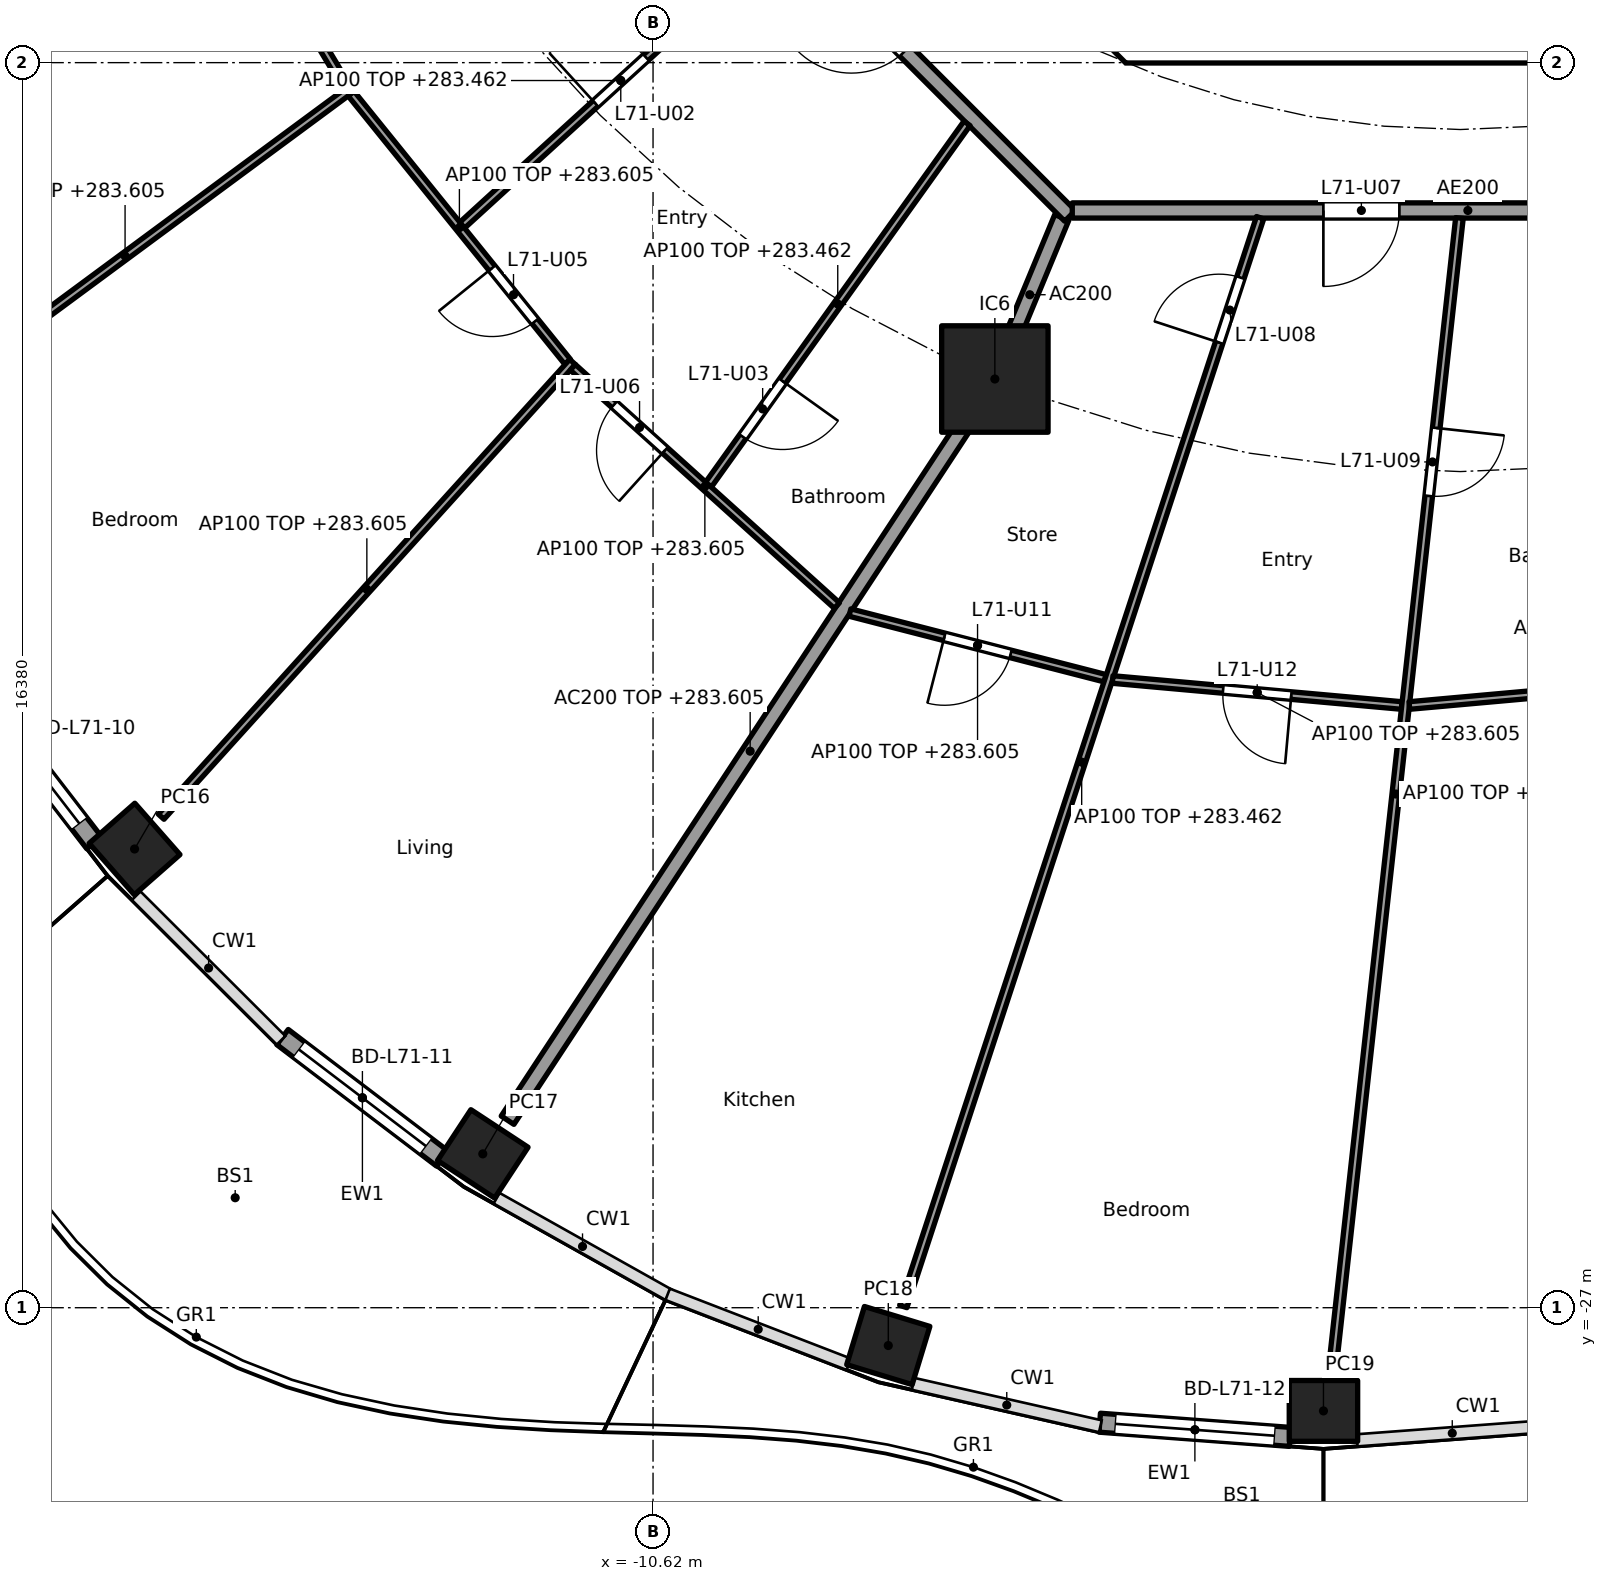
"""IFC4 building model, lengths in metres.
Left out: names, types, materials, properties, quantities, classifications, styles, units other than length and angle.
Written with IfcOpenShell. Run it as: python <this file> out.ifc"""

import sys

from ifc_helpers import new_model, si_unit, direction, frame, frame_2d, origin, origin_2d, place, context, subcontext, project, spatial, polyline, rectangle, hollow_rectangle, outline, extrude, element, fill, save


model = new_model("IFC4")
c1 = context("Model", 3, precision=1e-05, world=origin(), true_north=direction((0.0, 1.0)))
c2 = subcontext(c1, "Body", "Model", "MODEL_VIEW")
j1 = project(units=[si_unit("LENGTHUNIT", "METRE"), si_unit("PLANEANGLEUNIT", "RADIAN")], contexts=[c1])
p1 = place(None, origin())
s1 = spatial("IfcSite", under=j1, at=p1, CompositionType="ELEMENT")
p2 = place(p1, origin())
s2 = spatial("IfcBuilding", under=s1, at=p2, CompositionType="ELEMENT")
p3 = place(p2, frame((0.0, 0.0, 280.7)))
s3 = spatial("IfcBuildingStorey", under=s2, at=p3, CompositionType="ELEMENT", Elevation=280.7)
for number, where, z_axis, x_axis in (
    (1, (-17.441, -20.965, 0.0), (0.0, 0.0, 1.0), (0.66, -0.751, 0.0)),
    (2, (-12.86, -24.976, 0.0), (0.0, 0.0, 1.0), (0.836, -0.549, 0.0)),
    (3, (-7.525, -27.498, 0.0), (0.0, 0.0, 1.0), (0.957, -0.292, 0.0)),
    (4, (-1.8, -28.358, 0.0), (0.0, 0.0, 1.0), (1.0, 0.0, 0.0)),
):
    element("IfcColumn", number, at=place(p3, frame(where, z_axis=z_axis, x_axis=x_axis)), inside=s3, PredefinedType="COLUMN", context=c2, shape_type="SweptSolid", body=[
        extrude(hollow_rectangle(XDim=0.9, YDim=0.8, WallThickness=0.028, at=origin_2d()), origin(), (0.0, 0.0, 1.0), 3.7),
    ])
p4 = place(p3, frame((-6.123, -14.782, 0.0), z_axis=(0.0, 0.0, 1.0), x_axis=(1.0, 0.0, 0.0)))
e5 = element("IfcColumn", 5, at=p4, inside=s3, PredefinedType="COLUMN", context=c2, shape_type="SweptSolid", body=[
    extrude(rectangle(XDim=1.4, YDim=1.4, at=origin_2d()), origin(), (0.0, 0.0, 1.0), 3.7),
])
p5 = place(p3, frame((-17.97, -20.886, 0.0), z_axis=(0.0, 0.0, 1.0), x_axis=(-0.610432336622, 0.792068407656, 0.0)))
e6 = element("IfcWall", 6, at=p5, inside=s3, PredefinedType="SOLIDWALL", context=c2, shape_type="SweptSolid", body=[
    extrude(rectangle(XDim=2.746, YDim=0.25, at=frame_2d((1.373, 0.0))), origin(), (0.0, 0.0, 1.0), 3.44),
])
p6 = place(p5, frame((0.323, 0.0, 0.0)))
e7 = element("IfcOpeningElement", 7, at=p6, cuts=e6, PredefinedType="OPENING", context=c2, shape_type="SweptSolid", body=[
    extrude(rectangle(XDim=2.1, YDim=2.4, at=frame_2d((1.05, 1.2))), frame((0.0, 0.135, 0.0), z_axis=(0.0, -1.0, 0.0), x_axis=(1.0, 0.0, 0.0)), (0.0, 0.0, 1.0), 0.27),
])
p7 = place(p3, frame((-13.393, -25.037, 0.0), z_axis=(0.0, 0.0, 1.0), x_axis=(-0.796055284084, 0.605223912847, 0.0)))
e8 = element("IfcWall", 8, at=p7, inside=s3, PredefinedType="SOLIDWALL", context=c2, shape_type="SweptSolid", body=[
    extrude(rectangle(XDim=2.641, YDim=0.25, at=frame_2d((1.32, 0.0))), origin(), (0.0, 0.0, 1.0), 3.44),
])
p8 = place(p7, frame((0.27, 0.0, 0.0)))
e9 = element("IfcOpeningElement", 9, at=p8, cuts=e8, PredefinedType="OPENING", context=c2, shape_type="SweptSolid", body=[
    extrude(rectangle(XDim=2.1, YDim=2.4, at=frame_2d((1.05, 1.2))), frame((0.0, 0.135, 0.0), z_axis=(0.0, -1.0, 0.0), x_axis=(1.0, 0.0, 0.0)), (0.0, 0.0, 1.0), 0.27),
])
p9 = place(p3, frame((-2.24, -28.699, 0.0), z_axis=(0.0, 0.0, 1.0), x_axis=(-0.997236355794, 0.074294351616, 0.0)))
e10 = element("IfcWall", 10, at=p9, inside=s3, PredefinedType="SOLIDWALL", context=c2, shape_type="SweptSolid", body=[
    extrude(rectangle(XDim=2.51, YDim=0.25, at=frame_2d((1.255, 0.0))), origin(), (0.0, 0.0, 1.0), 3.44),
])
p10 = place(p9, frame((0.205, 0.0, 0.0)))
e11 = element("IfcOpeningElement", 11, at=p10, cuts=e10, PredefinedType="OPENING", context=c2, shape_type="SweptSolid", body=[
    extrude(rectangle(XDim=2.1, YDim=2.4, at=frame_2d((1.05, 1.2))), frame((0.0, 0.135, 0.0), z_axis=(0.0, -1.0, 0.0), x_axis=(1.0, 0.0, 0.0)), (0.0, 0.0, 1.0), 0.27),
])
p11 = place(p3, origin())
e12 = element("IfcWall", 12, at=p11, inside=s3, PredefinedType="SHEAR", context=c2, shape_type="SweptSolid", body=[
    extrude(outline(polyline([(-4.152, -10.025), (4.152, -10.025), (4.401, -9.776), (4.825, -10.2), (4.401, -10.625), (-4.401, -10.625), (-4.825, -10.2), (-4.401, -9.776), (-4.152, -10.025)])), origin(), (0.0, 0.0, 1.0), 3.44),
])
p12 = place(p3, frame((-5.243, -12.657, 0.0), z_axis=(0.0, 0.0, 1.0), x_axis=(-0.382770106157, -0.923843626288, 0.0)))
e13 = element("IfcWall", 13, at=p12, inside=s3, PredefinedType="PARTITIONING", context=c2, shape_type="SweptSolid", body=[
    extrude(rectangle(XDim=2.199, YDim=0.2, at=frame_2d((1.1, 0.0))), origin(), (0.0, 0.0, 1.0), 3.44),
])
p13 = place(p3, frame((-6.151, -14.824, 0.0), z_axis=(0.0, 0.0, 1.0), x_axis=(-0.549345577828, -0.835595258556, 0.0)))
e14 = element("IfcWall", 14, at=p13, inside=s3, PredefinedType="PARTITIONING", context=c2, shape_type="SweptSolid", body=[
    extrude(rectangle(XDim=11.62, YDim=0.2, at=frame_2d((5.81, 0.0))), origin(), (0.0, 0.0, 1.0), 2.905),
])
p14 = place(p3, frame((-12.635, -5.134, 0.0), z_axis=(0.0, 0.0, 1.0), x_axis=(0.707106781187, -0.707106781187, 0.0)))
e15 = element("IfcWall", 15, at=p14, inside=s3, PredefinedType="PARTITIONING", context=c2, shape_type="SweptSolid", body=[
    extrude(rectangle(XDim=10.609, YDim=0.2, at=frame_2d((5.305, 0.0))), origin(), (0.0, 0.0, 1.0), 3.44),
])
p15 = place(p14, frame((6.539, 0.0, 0.0)))
e16 = element("IfcOpeningElement", 16, at=p15, cuts=e15, PredefinedType="OPENING", context=c2, shape_type="SweptSolid", body=[
    extrude(rectangle(XDim=1.0, YDim=2.1, at=frame_2d((0.5, 1.05))), frame((0.0, 0.11, 0.0), z_axis=(0.0, -1.0, 0.0), x_axis=(1.0, 0.0, 0.0)), (0.0, 0.0, 1.0), 0.22),
])
p16 = place(p3, frame((-5.104, -12.565, 0.0), z_axis=(0.0, 0.0, 1.0), x_axis=(1.0, 0.0, 0.0)))
e17 = element("IfcWall", 17, at=p16, inside=s3, PredefinedType="PARTITIONING", context=c2, shape_type="SweptSolid", body=[
    extrude(rectangle(XDim=10.409, YDim=0.2, at=frame_2d((5.205, 0.0))), origin(), (0.0, 0.0, 1.0), 3.44),
])
p17 = place(p16, frame((3.303, 0.0, 0.0)))
e18 = element("IfcOpeningElement", 18, at=p17, cuts=e17, PredefinedType="OPENING", context=c2, shape_type="SweptSolid", body=[
    extrude(rectangle(XDim=1.0, YDim=2.1, at=frame_2d((0.5, 1.05))), frame((0.0, 0.11, 0.0), z_axis=(0.0, -1.0, 0.0), x_axis=(1.0, 0.0, 0.0)), (0.0, 0.0, 1.0), 0.22),
])
p18 = place(p3, frame((-16.946, -7.122, 0.0), z_axis=(0.0, 0.0, 1.0), x_axis=(0.514994556856, -0.857193447483, 0.0)))
e19 = element("IfcWall", 19, at=p18, inside=s3, PredefinedType="PARTITIONING", context=c2, shape_type="SweptSolid", body=[
    extrude(rectangle(XDim=4.462, YDim=0.1, at=frame_2d((2.231, 0.0))), origin(), (0.0, 0.0, 1.0), 2.905),
])
p19 = place(p18, frame((1.781, 0.0, 0.0)))
e20 = element("IfcOpeningElement", 20, at=p19, cuts=e19, PredefinedType="OPENING", context=c2, shape_type="SweptSolid", body=[
    extrude(rectangle(XDim=0.9, YDim=2.1, at=frame_2d((0.45, 1.05))), frame((0.0, 0.06, 0.0), z_axis=(0.0, -1.0, 0.0), x_axis=(1.0, 0.0, 0.0)), (0.0, 0.0, 1.0), 0.12),
])
p20 = place(p3, frame((-14.582, -10.96, 0.0), z_axis=(0.0, 0.0, 1.0), x_axis=(-0.804405200554, -0.594081032623, 0.0)))
e21 = element("IfcWall", 21, at=p20, inside=s3, PredefinedType="PARTITIONING", context=c2, shape_type="SweptSolid", body=[
    extrude(rectangle(XDim=7.418, YDim=0.1, at=frame_2d((3.709, 0.0))), origin(), (0.0, 0.0, 1.0), 2.905),
])
p21 = place(p3, frame((-14.591, -11.029, 0.0), z_axis=(0.0, 0.0, 1.0), x_axis=(0.628170338674, -0.778075848237, 0.0)))
e22 = element("IfcWall", 22, at=p21, inside=s3, PredefinedType="PARTITIONING", context=c2, shape_type="SweptSolid", body=[
    extrude(rectangle(XDim=4.532, YDim=0.1, at=frame_2d((2.266, 0.0))), origin(), (0.0, 0.0, 1.0), 2.905),
])
p22 = place(p21, frame((2.949, 0.0, 0.0)))
e23 = element("IfcOpeningElement", 23, at=p22, cuts=e22, PredefinedType="OPENING", context=c2, shape_type="SweptSolid", body=[
    extrude(rectangle(XDim=0.9, YDim=2.1, at=frame_2d((0.45, 1.05))), frame((0.0, 0.06, 0.0), z_axis=(0.0, -1.0, 0.0), x_axis=(1.0, 0.0, 0.0)), (0.0, 0.0, 1.0), 0.12),
])
p23 = place(p3, frame((-8.958, -8.952, 0.0), z_axis=(0.0, 0.0, 1.0), x_axis=(-0.73876526954, -0.673962815385, 0.0)))
e24 = element("IfcWall", 24, at=p23, inside=s3, PredefinedType="PARTITIONING", context=c2, shape_type="SweptSolid", body=[
    extrude(rectangle(XDim=5.647, YDim=0.1, at=frame_2d((2.824, 0.0))), origin(), (0.0, 0.0, 1.0), 2.762),
])
p24 = place(p23, frame((2.374, 0.0, 0.0)))
e25 = element("IfcOpeningElement", 25, at=p24, cuts=e24, PredefinedType="OPENING", context=c2, shape_type="SweptSolid", body=[
    extrude(rectangle(XDim=0.9, YDim=2.1, at=frame_2d((0.45, 1.05))), frame((0.0, 0.06, 0.0), z_axis=(0.0, -1.0, 0.0), x_axis=(1.0, 0.0, 0.0)), (0.0, 0.0, 1.0), 0.12),
])
p25 = place(p3, frame((-11.679, -14.557, 0.0), z_axis=(0.0, 0.0, 1.0), x_axis=(-0.670800011545, -0.741638284146, 0.0)))
e26 = element("IfcWall", 26, at=p25, inside=s3, PredefinedType="PARTITIONING", context=c2, shape_type="SweptSolid", body=[
    extrude(rectangle(XDim=8.068, YDim=0.1, at=frame_2d((4.034, 0.0))), origin(), (0.0, 0.0, 1.0), 2.905),
])
p26 = place(p3, frame((-11.676, -14.628, 0.0), z_axis=(0.0, 0.0, 1.0), x_axis=(0.74245829867, -0.669892285921, 0.0)))
e27 = element("IfcWall", 27, at=p26, inside=s3, PredefinedType="PARTITIONING", context=c2, shape_type="SweptSolid", body=[
    extrude(rectangle(XDim=4.68, YDim=0.1, at=frame_2d((2.34, 0.0))), origin(), (0.0, 0.0, 1.0), 2.905),
])
p27 = place(p26, frame((0.732, 0.0, 0.0)))
e28 = element("IfcOpeningElement", 28, at=p27, cuts=e27, PredefinedType="OPENING", context=c2, shape_type="SweptSolid", body=[
    extrude(rectangle(XDim=0.9, YDim=2.1, at=frame_2d((0.45, 1.05))), frame((0.0, 0.06, 0.0), z_axis=(0.0, -1.0, 0.0), x_axis=(1.0, 0.0, 0.0)), (0.0, 0.0, 1.0), 0.12),
])
p28 = place(p3, frame((-6.49, -11.419, 0.0), z_axis=(0.0, 0.0, 1.0), x_axis=(-0.58201647594, -0.813176992871, 0.0)))
e29 = element("IfcWall", 29, at=p28, inside=s3, PredefinedType="PARTITIONING", context=c2, shape_type="SweptSolid", body=[
    extrude(rectangle(XDim=5.844, YDim=0.1, at=frame_2d((2.922, 0.0))), origin(), (0.0, 0.0, 1.0), 2.762),
])
p29 = place(p28, frame((4.169, 0.0, 0.0)))
e30 = element("IfcOpeningElement", 30, at=p29, cuts=e29, PredefinedType="OPENING", context=c2, shape_type="SweptSolid", body=[
    extrude(rectangle(XDim=0.9, YDim=2.1, at=frame_2d((0.45, 1.05))), frame((0.0, 0.06, 0.0), z_axis=(0.0, -1.0, 0.0), x_axis=(1.0, 0.0, 0.0)), (0.0, 0.0, 1.0), 0.12),
])
p30 = place(p3, frame((-8.03, -17.854, 0.0), z_axis=(0.0, 0.0, 1.0), x_axis=(0.968441967324, -0.249239154077, 0.0)))
e31 = element("IfcWall", 31, at=p30, inside=s3, PredefinedType="PARTITIONING", context=c2, shape_type="SweptSolid", body=[
    extrude(rectangle(XDim=3.468, YDim=0.1, at=frame_2d((1.734, 0.0))), origin(), (0.0, 0.0, 1.0), 2.905),
])
p31 = place(p30, frame((1.284, 0.0, 0.0)))
e32 = element("IfcOpeningElement", 32, at=p31, cuts=e31, PredefinedType="OPENING", context=c2, shape_type="SweptSolid", body=[
    extrude(rectangle(XDim=0.9, YDim=2.1, at=frame_2d((0.45, 1.05))), frame((0.0, 0.06, 0.0), z_axis=(0.0, -1.0, 0.0), x_axis=(1.0, 0.0, 0.0)), (0.0, 0.0, 1.0), 0.12),
])
p32 = place(p3, frame((-2.633, -12.66, 0.0), z_axis=(0.0, 0.0, 1.0), x_axis=(-0.311432955908, -0.950268127412, 0.0)))
e33 = element("IfcWall", 33, at=p32, inside=s3, PredefinedType="PARTITIONING", context=c2, shape_type="SweptSolid", body=[
    extrude(rectangle(XDim=15.074, YDim=0.1, at=frame_2d((7.537, 0.0))), origin(), (0.0, 0.0, 1.0), 2.762),
])
p33 = place(p32, frame((0.829, 0.0, 0.0)))
e34 = element("IfcOpeningElement", 34, at=p33, cuts=e33, PredefinedType="OPENING", context=c2, shape_type="SweptSolid", body=[
    extrude(rectangle(XDim=0.9, YDim=2.1, at=frame_2d((0.45, 1.05))), frame((0.0, 0.06, 0.0), z_axis=(0.0, -1.0, 0.0), x_axis=(1.0, 0.0, 0.0)), (0.0, 0.0, 1.0), 0.12),
])
p34 = place(p3, frame((-4.573, -18.736, 0.0), z_axis=(0.0, 0.0, 1.0), x_axis=(0.995986472869, -0.089503887414, 0.0)))
e35 = element("IfcWall", 35, at=p34, inside=s3, PredefinedType="PARTITIONING", context=c2, shape_type="SweptSolid", body=[
    extrude(rectangle(XDim=3.819, YDim=0.1, at=frame_2d((1.909, 0.0))), origin(), (0.0, 0.0, 1.0), 2.905),
])
p35 = place(p34, frame((1.459, 0.0, 0.0)))
e36 = element("IfcOpeningElement", 36, at=p35, cuts=e35, PredefinedType="OPENING", context=c2, shape_type="SweptSolid", body=[
    extrude(rectangle(XDim=0.9, YDim=2.1, at=frame_2d((0.45, 1.05))), frame((0.0, 0.06, 0.0), z_axis=(0.0, -1.0, 0.0), x_axis=(1.0, 0.0, 0.0)), (0.0, 0.0, 1.0), 0.12),
])
p36 = place(p3, frame((-0.011, -12.664, 0.0), z_axis=(0.0, 0.0, 1.0), x_axis=(-0.109805889692, -0.993953050495, 0.0)))
e37 = element("IfcWall", 37, at=p36, inside=s3, PredefinedType="PARTITIONING", context=c2, shape_type="SweptSolid", body=[
    extrude(rectangle(XDim=15.248, YDim=0.1, at=frame_2d((7.624, 0.0))), origin(), (0.0, 0.0, 1.0), 2.762),
])
p37 = place(p36, frame((2.778, 0.0, 0.0)))
e38 = element("IfcOpeningElement", 38, at=p37, cuts=e37, PredefinedType="OPENING", context=c2, shape_type="SweptSolid", body=[
    extrude(rectangle(XDim=0.9, YDim=2.1, at=frame_2d((0.45, 1.05))), frame((0.0, 0.06, 0.0), z_axis=(0.0, -1.0, 0.0), x_axis=(1.0, 0.0, 0.0)), (0.0, 0.0, 1.0), 0.12),
])
p38 = place(p3, frame((-0.67, -19.077, 0.0), z_axis=(0.0, 0.0, 1.0), x_axis=(0.995986472869, 0.089503887414, 0.0)))
e39 = element("IfcWall", 39, at=p38, inside=s3, PredefinedType="PARTITIONING", context=c2, shape_type="SweptSolid", body=[
    extrude(rectangle(XDim=3.819, YDim=0.1, at=frame_2d((1.909, 0.0))), origin(), (0.0, 0.0, 1.0), 2.905),
])
p39 = place(p6, origin())
e40 = element("IfcDoor", 40, at=p39, inside=s3, OperationType="SLIDING_TO_LEFT", PredefinedType="DOOR", context=c2, shape_type="SweptSolid", body=[
    extrude(rectangle(XDim=2.1, YDim=2.4, at=frame_2d((1.05, 1.2))), frame((0.0, 0.025, 0.0), z_axis=(0.0, -1.0, 0.0), x_axis=(1.0, 0.0, 0.0)), (0.0, 0.0, 1.0), 0.05),
])
fill(e7, e40)
p40 = place(p8, origin())
e41 = element("IfcDoor", 41, at=p40, inside=s3, OperationType="SLIDING_TO_LEFT", PredefinedType="DOOR", context=c2, shape_type="SweptSolid", body=[
    extrude(rectangle(XDim=2.1, YDim=2.4, at=frame_2d((1.05, 1.2))), frame((0.0, 0.025, 0.0), z_axis=(0.0, -1.0, 0.0), x_axis=(1.0, 0.0, 0.0)), (0.0, 0.0, 1.0), 0.05),
])
fill(e9, e41)
p41 = place(p10, origin())
e42 = element("IfcDoor", 42, at=p41, inside=s3, OperationType="SLIDING_TO_LEFT", PredefinedType="DOOR", context=c2, shape_type="SweptSolid", body=[
    extrude(rectangle(XDim=2.1, YDim=2.4, at=frame_2d((1.05, 1.2))), frame((0.0, 0.025, 0.0), z_axis=(0.0, -1.0, 0.0), x_axis=(1.0, 0.0, 0.0)), (0.0, 0.0, 1.0), 0.05),
])
fill(e11, e42)
p42 = place(p24, frame((0.9, 0.0, 0.0), x_axis=(-1.0, 0.0, 0.0)))
e43 = element("IfcDoor", 43, at=p42, inside=s3, OperationType="SINGLE_SWING_LEFT", PredefinedType="DOOR", context=c2, shape_type="SweptSolid", body=[
    extrude(rectangle(XDim=0.9, YDim=2.1, at=frame_2d((0.45, 1.05))), frame((0.0, 0.025, 0.0), z_axis=(0.0, -1.0, 0.0), x_axis=(1.0, 0.0, 0.0)), (0.0, 0.0, 1.0), 0.05),
])
fill(e25, e43)
p43 = place(p29, origin())
e44 = element("IfcDoor", 44, at=p43, inside=s3, OperationType="SINGLE_SWING_LEFT", PredefinedType="DOOR", context=c2, shape_type="SweptSolid", body=[
    extrude(rectangle(XDim=0.9, YDim=2.1, at=frame_2d((0.45, 1.05))), frame((0.0, 0.025, 0.0), z_axis=(0.0, -1.0, 0.0), x_axis=(1.0, 0.0, 0.0)), (0.0, 0.0, 1.0), 0.05),
])
fill(e30, e44)
p44 = place(p22, frame((0.9, 0.0, 0.0), x_axis=(-1.0, 0.0, 0.0)))
e45 = element("IfcDoor", 45, at=p44, inside=s3, OperationType="SINGLE_SWING_RIGHT", PredefinedType="DOOR", context=c2, shape_type="SweptSolid", body=[
    extrude(rectangle(XDim=0.9, YDim=2.1, at=frame_2d((0.45, 1.05))), frame((0.0, 0.025, 0.0), z_axis=(0.0, -1.0, 0.0), x_axis=(1.0, 0.0, 0.0)), (0.0, 0.0, 1.0), 0.05),
])
fill(e23, e45)
p45 = place(p27, frame((0.9, 0.0, 0.0), x_axis=(-1.0, 0.0, 0.0)))
e46 = element("IfcDoor", 46, at=p45, inside=s3, OperationType="SINGLE_SWING_LEFT", PredefinedType="DOOR", context=c2, shape_type="SweptSolid", body=[
    extrude(rectangle(XDim=0.9, YDim=2.1, at=frame_2d((0.45, 1.05))), frame((0.0, 0.025, 0.0), z_axis=(0.0, -1.0, 0.0), x_axis=(1.0, 0.0, 0.0)), (0.0, 0.0, 1.0), 0.05),
])
fill(e28, e46)
p46 = place(p17, frame((1.0, 0.0, 0.0), x_axis=(-1.0, 0.0, 0.0)))
e47 = element("IfcDoor", 47, at=p46, inside=s3, OperationType="SINGLE_SWING_RIGHT", PredefinedType="DOOR", context=c2, shape_type="SweptSolid", body=[
    extrude(rectangle(XDim=1.0, YDim=2.1, at=frame_2d((0.5, 1.05))), frame((0.0, 0.025, 0.0), z_axis=(0.0, -1.0, 0.0), x_axis=(1.0, 0.0, 0.0)), (0.0, 0.0, 1.0), 0.05),
])
fill(e18, e47)
p47 = place(p33, frame((0.9, 0.0, 0.0), x_axis=(-1.0, 0.0, 0.0)))
e48 = element("IfcDoor", 48, at=p47, inside=s3, OperationType="SINGLE_SWING_LEFT", PredefinedType="DOOR", context=c2, shape_type="SweptSolid", body=[
    extrude(rectangle(XDim=0.9, YDim=2.1, at=frame_2d((0.45, 1.05))), frame((0.0, 0.025, 0.0), z_axis=(0.0, -1.0, 0.0), x_axis=(1.0, 0.0, 0.0)), (0.0, 0.0, 1.0), 0.05),
])
fill(e34, e48)
p48 = place(p37, origin())
e49 = element("IfcDoor", 49, at=p48, inside=s3, OperationType="SINGLE_SWING_LEFT", PredefinedType="DOOR", context=c2, shape_type="SweptSolid", body=[
    extrude(rectangle(XDim=0.9, YDim=2.1, at=frame_2d((0.45, 1.05))), frame((0.0, 0.025, 0.0), z_axis=(0.0, -1.0, 0.0), x_axis=(1.0, 0.0, 0.0)), (0.0, 0.0, 1.0), 0.05),
])
fill(e38, e49)
p49 = place(p31, frame((0.9, 0.0, 0.0), x_axis=(-1.0, 0.0, 0.0)))
e50 = element("IfcDoor", 50, at=p49, inside=s3, OperationType="SINGLE_SWING_RIGHT", PredefinedType="DOOR", context=c2, shape_type="SweptSolid", body=[
    extrude(rectangle(XDim=0.9, YDim=2.1, at=frame_2d((0.45, 1.05))), frame((0.0, 0.025, 0.0), z_axis=(0.0, -1.0, 0.0), x_axis=(1.0, 0.0, 0.0)), (0.0, 0.0, 1.0), 0.05),
])
fill(e32, e50)
p50 = place(p35, frame((0.9, 0.0, 0.0), x_axis=(-1.0, 0.0, 0.0)))
e51 = element("IfcDoor", 51, at=p50, inside=s3, OperationType="SINGLE_SWING_LEFT", PredefinedType="DOOR", context=c2, shape_type="SweptSolid", body=[
    extrude(rectangle(XDim=0.9, YDim=2.1, at=frame_2d((0.45, 1.05))), frame((0.0, 0.025, 0.0), z_axis=(0.0, -1.0, 0.0), x_axis=(1.0, 0.0, 0.0)), (0.0, 0.0, 1.0), 0.05),
])
fill(e36, e51)
save(model, sys.argv[1])
